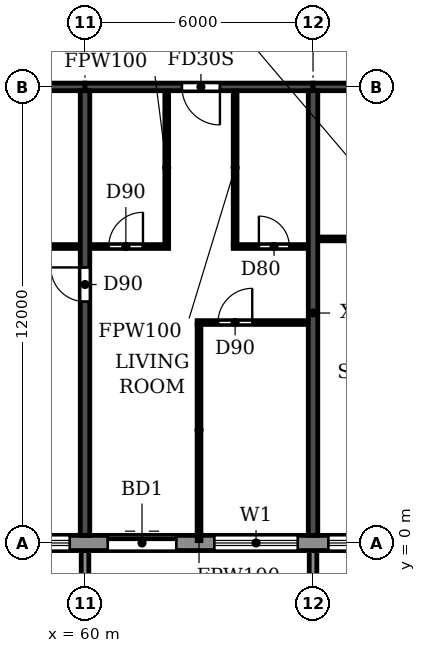
"""IFC4 building model, lengths in metres.
Left out: names, types, materials, properties, quantities, classifications, styles, units other than length and angle.
Written with IfcOpenShell. Run it as: python <this file> out.ifc"""

import sys

from ifc_helpers import new_model, si_unit, direction, frame, frame_2d, origin, place, context, subcontext, project, spatial, polyline, rectangle, outline, extrude, source, transform, mapped, element, fill, save


model = new_model("IFC4")
c1 = context("Model", 3, precision=1e-05, world=origin(), true_north=direction((0.0, 1.0)))
c2 = subcontext(c1, "Body", "Model", "MODEL_VIEW")
j1 = project(units=[si_unit("LENGTHUNIT", "METRE"), si_unit("PLANEANGLEUNIT", "RADIAN")], contexts=[c1])
p1 = place(None, origin())
s1 = spatial("IfcSite", under=j1, at=p1, CompositionType="ELEMENT")
p2 = place(p1, origin())
s2 = spatial("IfcBuilding", under=s1, at=p2, CompositionType="ELEMENT")
p3 = place(p2, frame((0.0, 0.0, 221.4)))
s3 = spatial("IfcBuildingStorey", under=s2, at=p3, CompositionType="ELEMENT", Elevation=221.4)
p4 = place(p3, frame((60.0, 0.2, 0.0), z_axis=(0.0, 0.0, 1.0), x_axis=(0.0, 1.0, 0.0)))
e1 = element("IfcWall", 1, at=p4, inside=s3, PredefinedType="SHEAR", context=c2, shape_type="SweptSolid", body=[
    extrude(rectangle(XDim=11.7, YDim=0.25, at=frame_2d((5.85, 0.0))), origin(), (0.0, 0.0, 1.0), 3.08),
])
p5 = place(p4, frame((6.15, 0.0, 0.0)))
e2 = element("IfcOpeningElement", 2, at=p5, cuts=e1, PredefinedType="OPENING", context=c2, shape_type="SweptSolid", body=[
    extrude(rectangle(XDim=0.9, YDim=2.1, at=frame_2d((0.45, 1.05))), frame((0.0, 0.135, 0.0), z_axis=(0.0, -1.0, 0.0), x_axis=(1.0, 0.0, 0.0)), (0.0, 0.0, 1.0), 0.27),
])
p6 = place(p3, frame((66.0, 0.2, 0.0), z_axis=(0.0, 0.0, 1.0), x_axis=(0.0, 1.0, 0.0)))
e3 = element("IfcWall", 3, at=p6, inside=s3, PredefinedType="SHEAR", context=c2, shape_type="SweptSolid", body=[
    extrude(rectangle(XDim=11.7, YDim=0.25, at=frame_2d((5.85, 0.0))), origin(), (0.0, 0.0, 1.0), 3.08),
])
p7 = place(p3, frame((54.0, 12.0, 0.0), z_axis=(0.0, 0.0, 1.0), x_axis=(1.0, 0.0, 0.0)))
e4 = element("IfcWall", 4, at=p7, inside=s3, PredefinedType="SHEAR", context=c2, shape_type="SweptSolid", body=[
    extrude(rectangle(XDim=6.0, YDim=0.2, at=frame_2d((3.0, 0.0))), origin(), (0.0, 0.0, 1.0), 2.48),
])
p8 = place(p3, frame((60.0, 12.0, 0.0), z_axis=(0.0, 0.0, 1.0), x_axis=(1.0, 0.0, 0.0)))
e5 = element("IfcWall", 5, at=p8, inside=s3, PredefinedType="SHEAR", context=c2, shape_type="SweptSolid", body=[
    extrude(rectangle(XDim=6.0, YDim=0.2, at=frame_2d((3.0, 0.0))), origin(), (0.0, 0.0, 1.0), 2.48),
])
p9 = place(p8, frame((2.55, 0.0, 0.0)))
e6 = element("IfcOpeningElement", 6, at=p9, cuts=e5, PredefinedType="OPENING", context=c2, shape_type="SweptSolid", body=[
    extrude(rectangle(XDim=1.0, YDim=2.1, at=frame_2d((0.5, 1.05))), frame((0.0, 0.11, 0.0), z_axis=(0.0, -1.0, 0.0), x_axis=(1.0, 0.0, 0.0)), (0.0, 0.0, 1.0), 0.22),
])
p10 = place(p3, frame((66.0, 12.0, 0.0), z_axis=(0.0, 0.0, 1.0), x_axis=(1.0, 0.0, 0.0)))
e7 = element("IfcWall", 7, at=p10, inside=s3, PredefinedType="SHEAR", context=c2, shape_type="SweptSolid", body=[
    extrude(rectangle(XDim=6.0, YDim=0.2, at=frame_2d((3.0, 0.0))), origin(), (0.0, 0.0, 1.0), 2.48),
])
p11 = place(p10, frame((2.45, 0.0, 0.0)))
e8 = element("IfcOpeningElement", 8, at=p11, cuts=e7, PredefinedType="OPENING", context=c2, shape_type="SweptSolid", body=[
    extrude(rectangle(XDim=1.0, YDim=2.1, at=frame_2d((0.5, 1.05))), frame((0.0, 0.11, 0.0), z_axis=(0.0, -1.0, 0.0), x_axis=(1.0, 0.0, 0.0)), (0.0, 0.0, 1.0), 0.22),
])
p12 = place(p3, frame((22.683, 0.0, 0.0), z_axis=(0.0, 0.0, 1.0), x_axis=(1.0, 0.0, 0.0)))
e9 = element("IfcWall", 9, at=p12, inside=s3, PredefinedType="STANDARD", context=c2, shape_type="SweptSolid", body=[
    extrude(rectangle(XDim=56.634, YDim=0.4, at=frame_2d((28.317, 0.0))), origin(), (0.0, 0.0, 1.0), 3.08),
])
p13 = place(p12, frame((1.717, 0.0, 0.9)))
e10 = element("IfcOpeningElement", 10, at=p13, cuts=e9, PredefinedType="OPENING", context=c2, shape_type="SweptSolid", body=[
    extrude(rectangle(XDim=2.2, YDim=1.5, at=frame_2d((1.1, 0.75))), frame((0.0, 0.21, 0.0), z_axis=(0.0, -1.0, 0.0), x_axis=(1.0, 0.0, 0.0)), (0.0, 0.0, 1.0), 0.42),
])
p14 = place(p12, frame((4.917, 0.0, 0.0)))
e11 = element("IfcOpeningElement", 11, at=p14, cuts=e9, PredefinedType="OPENING", context=c2, shape_type="SweptSolid", body=[
    extrude(rectangle(XDim=1.8, YDim=2.4, at=frame_2d((0.9, 1.2))), frame((0.0, 0.21, 0.0), z_axis=(0.0, -1.0, 0.0), x_axis=(1.0, 0.0, 0.0)), (0.0, 0.0, 1.0), 0.42),
])
p15 = place(p12, frame((7.717, 0.0, 0.9)))
e12 = element("IfcOpeningElement", 12, at=p15, cuts=e9, PredefinedType="OPENING", context=c2, shape_type="SweptSolid", body=[
    extrude(rectangle(XDim=2.2, YDim=1.5, at=frame_2d((1.1, 0.75))), frame((0.0, 0.21, 0.0), z_axis=(0.0, -1.0, 0.0), x_axis=(1.0, 0.0, 0.0)), (0.0, 0.0, 1.0), 0.42),
])
p16 = place(p12, frame((10.717, 0.0, 0.9)))
e13 = element("IfcOpeningElement", 13, at=p16, cuts=e9, PredefinedType="OPENING", context=c2, shape_type="SweptSolid", body=[
    extrude(rectangle(XDim=2.2, YDim=1.5, at=frame_2d((1.1, 0.75))), frame((0.0, 0.21, 0.0), z_axis=(0.0, -1.0, 0.0), x_axis=(1.0, 0.0, 0.0)), (0.0, 0.0, 1.0), 0.42),
])
p17 = place(p12, frame((13.717, 0.0, 0.9)))
e14 = element("IfcOpeningElement", 14, at=p17, cuts=e9, PredefinedType="OPENING", context=c2, shape_type="SweptSolid", body=[
    extrude(rectangle(XDim=2.2, YDim=1.5, at=frame_2d((1.1, 0.75))), frame((0.0, 0.21, 0.0), z_axis=(0.0, -1.0, 0.0), x_axis=(1.0, 0.0, 0.0)), (0.0, 0.0, 1.0), 0.42),
])
p18 = place(p12, frame((16.917, 0.0, 0.0)))
e15 = element("IfcOpeningElement", 15, at=p18, cuts=e9, PredefinedType="OPENING", context=c2, shape_type="SweptSolid", body=[
    extrude(rectangle(XDim=1.8, YDim=2.4, at=frame_2d((0.9, 1.2))), frame((0.0, 0.21, 0.0), z_axis=(0.0, -1.0, 0.0), x_axis=(1.0, 0.0, 0.0)), (0.0, 0.0, 1.0), 0.42),
])
p19 = place(p12, frame((19.717, 0.0, 0.9)))
e16 = element("IfcOpeningElement", 16, at=p19, cuts=e9, PredefinedType="OPENING", context=c2, shape_type="SweptSolid", body=[
    extrude(rectangle(XDim=2.2, YDim=1.5, at=frame_2d((1.1, 0.75))), frame((0.0, 0.21, 0.0), z_axis=(0.0, -1.0, 0.0), x_axis=(1.0, 0.0, 0.0)), (0.0, 0.0, 1.0), 0.42),
])
p20 = place(p12, frame((22.717, 0.0, 0.9)))
e17 = element("IfcOpeningElement", 17, at=p20, cuts=e9, PredefinedType="OPENING", context=c2, shape_type="SweptSolid", body=[
    extrude(rectangle(XDim=2.2, YDim=1.5, at=frame_2d((1.1, 0.75))), frame((0.0, 0.21, 0.0), z_axis=(0.0, -1.0, 0.0), x_axis=(1.0, 0.0, 0.0)), (0.0, 0.0, 1.0), 0.42),
])
p21 = place(p12, frame((25.917, 0.0, 0.0)))
e18 = element("IfcOpeningElement", 18, at=p21, cuts=e9, PredefinedType="OPENING", context=c2, shape_type="SweptSolid", body=[
    extrude(rectangle(XDim=1.8, YDim=2.4, at=frame_2d((0.9, 1.2))), frame((0.0, 0.21, 0.0), z_axis=(0.0, -1.0, 0.0), x_axis=(1.0, 0.0, 0.0)), (0.0, 0.0, 1.0), 0.42),
])
p22 = place(p12, frame((28.717, 0.0, 0.9)))
e19 = element("IfcOpeningElement", 19, at=p22, cuts=e9, PredefinedType="OPENING", context=c2, shape_type="SweptSolid", body=[
    extrude(rectangle(XDim=2.2, YDim=1.5, at=frame_2d((1.1, 0.75))), frame((0.0, 0.21, 0.0), z_axis=(0.0, -1.0, 0.0), x_axis=(1.0, 0.0, 0.0)), (0.0, 0.0, 1.0), 0.42),
])
p23 = place(p12, frame((31.717, 0.0, 0.9)))
e20 = element("IfcOpeningElement", 20, at=p23, cuts=e9, PredefinedType="OPENING", context=c2, shape_type="SweptSolid", body=[
    extrude(rectangle(XDim=2.2, YDim=1.5, at=frame_2d((1.1, 0.75))), frame((0.0, 0.21, 0.0), z_axis=(0.0, -1.0, 0.0), x_axis=(1.0, 0.0, 0.0)), (0.0, 0.0, 1.0), 0.42),
])
p24 = place(p12, frame((34.717, 0.0, 0.9)))
e21 = element("IfcOpeningElement", 21, at=p24, cuts=e9, PredefinedType="OPENING", context=c2, shape_type="SweptSolid", body=[
    extrude(rectangle(XDim=2.2, YDim=1.5, at=frame_2d((1.1, 0.75))), frame((0.0, 0.21, 0.0), z_axis=(0.0, -1.0, 0.0), x_axis=(1.0, 0.0, 0.0)), (0.0, 0.0, 1.0), 0.42),
])
p25 = place(p12, frame((37.917, 0.0, 0.0)))
e22 = element("IfcOpeningElement", 22, at=p25, cuts=e9, PredefinedType="OPENING", context=c2, shape_type="SweptSolid", body=[
    extrude(rectangle(XDim=1.8, YDim=2.4, at=frame_2d((0.9, 1.2))), frame((0.0, 0.21, 0.0), z_axis=(0.0, -1.0, 0.0), x_axis=(1.0, 0.0, 0.0)), (0.0, 0.0, 1.0), 0.42),
])
p26 = place(p12, frame((40.717, 0.0, 0.9)))
e23 = element("IfcOpeningElement", 23, at=p26, cuts=e9, PredefinedType="OPENING", context=c2, shape_type="SweptSolid", body=[
    extrude(rectangle(XDim=2.2, YDim=1.5, at=frame_2d((1.1, 0.75))), frame((0.0, 0.21, 0.0), z_axis=(0.0, -1.0, 0.0), x_axis=(1.0, 0.0, 0.0)), (0.0, 0.0, 1.0), 0.42),
])
p27 = place(p12, frame((43.717, 0.0, 0.9)))
e24 = element("IfcOpeningElement", 24, at=p27, cuts=e9, PredefinedType="OPENING", context=c2, shape_type="SweptSolid", body=[
    extrude(rectangle(XDim=2.2, YDim=1.5, at=frame_2d((1.1, 0.75))), frame((0.0, 0.21, 0.0), z_axis=(0.0, -1.0, 0.0), x_axis=(1.0, 0.0, 0.0)), (0.0, 0.0, 1.0), 0.42),
])
p28 = place(p12, frame((46.717, 0.0, 0.9)))
e25 = element("IfcOpeningElement", 25, at=p28, cuts=e9, PredefinedType="OPENING", context=c2, shape_type="SweptSolid", body=[
    extrude(rectangle(XDim=2.2, YDim=1.5, at=frame_2d((1.1, 0.75))), frame((0.0, 0.21, 0.0), z_axis=(0.0, -1.0, 0.0), x_axis=(1.0, 0.0, 0.0)), (0.0, 0.0, 1.0), 0.42),
])
p29 = place(p12, frame((49.917, 0.0, 0.0)))
e26 = element("IfcOpeningElement", 26, at=p29, cuts=e9, PredefinedType="OPENING", context=c2, shape_type="SweptSolid", body=[
    extrude(rectangle(XDim=1.8, YDim=2.4, at=frame_2d((0.9, 1.2))), frame((0.0, 0.21, 0.0), z_axis=(0.0, -1.0, 0.0), x_axis=(1.0, 0.0, 0.0)), (0.0, 0.0, 1.0), 0.42),
])
p30 = place(p12, frame((52.717, 0.0, 0.9)))
e27 = element("IfcOpeningElement", 27, at=p30, cuts=e9, PredefinedType="OPENING", context=c2, shape_type="SweptSolid", body=[
    extrude(rectangle(XDim=2.2, YDim=1.5, at=frame_2d((1.1, 0.75))), frame((0.0, 0.21, 0.0), z_axis=(0.0, -1.0, 0.0), x_axis=(1.0, 0.0, 0.0)), (0.0, 0.0, 1.0), 0.42),
])
m1 = source(origin(), c2, "Body", "SweptSolid", [
    extrude(outline(polyline([(0.0, 0.0), (0.2, 0.0), (0.2, 1.65), (0.0, 1.65), (0.0, 0.0)])), origin(), (0.0, 0.0, 1.0), 3.1),
])
for number, where in (
    (28, (59.9, -1.85, 0.0)),
    (29, (65.9, -1.85, 0.0)),
):
    element("IfcWall", number, at=place(p3, frame(where)), inside=s3, PredefinedType="STANDARD", context=c2, shape_type="MappedRepresentation", body=[
        mapped(m1, transform((0.0, 0.0, 0.0))),
    ])
p31 = place(p3, frame((62.95, 5.8, 0.0), z_axis=(0.0, 0.0, 1.0), x_axis=(1.0, 0.0, 0.0)))
e30 = element("IfcWall", 30, at=p31, inside=s3, PredefinedType="PARTITIONING", context=c2, shape_type="SweptSolid", body=[
    extrude(rectangle(XDim=2.915, YDim=0.1, at=frame_2d((1.458, 0.0))), origin(), (0.0, 0.0, 1.0), 3.08),
])
p32 = place(p31, frame((0.55, 0.0, 0.0)))
e31 = element("IfcOpeningElement", 31, at=p32, cuts=e30, PredefinedType="OPENING", context=c2, shape_type="SweptSolid", body=[
    extrude(rectangle(XDim=0.9, YDim=2.1, at=frame_2d((0.45, 1.05))), frame((0.0, 0.06, 0.0), z_axis=(0.0, -1.0, 0.0), x_axis=(1.0, 0.0, 0.0)), (0.0, 0.0, 1.0), 0.12),
])
p33 = place(p3, frame((57.1, 7.8, 0.0), z_axis=(0.0, 0.0, 1.0), x_axis=(1.0, 0.0, 0.0)))
e32 = element("IfcWall", 32, at=p33, inside=s3, PredefinedType="PARTITIONING", context=c2, shape_type="SweptSolid", body=[
    extrude(rectangle(XDim=2.765, YDim=0.1, at=frame_2d((1.382, 0.0))), origin(), (0.0, 0.0, 1.0), 3.08),
])
p34 = place(p33, frame((1.0, 0.0, 0.0)))
e33 = element("IfcOpeningElement", 33, at=p34, cuts=e32, PredefinedType="OPENING", context=c2, shape_type="SweptSolid", body=[
    extrude(rectangle(XDim=0.8, YDim=2.1, at=frame_2d((0.4, 1.05))), frame((0.0, 0.06, 0.0), z_axis=(0.0, -1.0, 0.0), x_axis=(1.0, 0.0, 0.0)), (0.0, 0.0, 1.0), 0.12),
])
p35 = place(p3, frame((60.135, 7.8, 0.0), z_axis=(0.0, 0.0, 1.0), x_axis=(1.0, 0.0, 0.0)))
e34 = element("IfcWall", 34, at=p35, inside=s3, PredefinedType="PARTITIONING", context=c2, shape_type="SweptSolid", body=[
    extrude(rectangle(XDim=2.065, YDim=0.1, at=frame_2d((1.032, 0.0))), origin(), (0.0, 0.0, 1.0), 3.08),
])
p36 = place(p35, frame((0.49, 0.0, 0.0)))
e35 = element("IfcOpeningElement", 35, at=p36, cuts=e34, PredefinedType="OPENING", context=c2, shape_type="SweptSolid", body=[
    extrude(rectangle(XDim=0.9, YDim=2.1, at=frame_2d((0.45, 1.05))), frame((0.0, 0.06, 0.0), z_axis=(0.0, -1.0, 0.0), x_axis=(1.0, 0.0, 0.0)), (0.0, 0.0, 1.0), 0.12),
])
p37 = place(p3, frame((63.9, 7.8, 0.0), z_axis=(0.0, 0.0, 1.0), x_axis=(1.0, 0.0, 0.0)))
e36 = element("IfcWall", 36, at=p37, inside=s3, PredefinedType="PARTITIONING", context=c2, shape_type="SweptSolid", body=[
    extrude(rectangle(XDim=1.965, YDim=0.1, at=frame_2d((0.982, 0.0))), origin(), (0.0, 0.0, 1.0), 3.08),
])
p38 = place(p37, frame((0.675, 0.0, 0.0)))
e37 = element("IfcOpeningElement", 37, at=p38, cuts=e36, PredefinedType="OPENING", context=c2, shape_type="SweptSolid", body=[
    extrude(rectangle(XDim=0.8, YDim=2.1, at=frame_2d((0.4, 1.05))), frame((0.0, 0.06, 0.0), z_axis=(0.0, -1.0, 0.0), x_axis=(1.0, 0.0, 0.0)), (0.0, 0.0, 1.0), 0.12),
])
p39 = place(p3, frame((66.135, 8.0, 0.0), z_axis=(0.0, 0.0, 1.0), x_axis=(1.0, 0.0, 0.0)))
e38 = element("IfcWall", 38, at=p39, inside=s3, PredefinedType="PARTITIONING", context=c2, shape_type="SweptSolid", body=[
    extrude(rectangle(XDim=1.965, YDim=0.1, at=frame_2d((0.982, 0.0))), origin(), (0.0, 0.0, 1.0), 3.08),
])
p40 = place(p3, frame((62.15, 7.85, 0.0), z_axis=(0.0, 0.0, 1.0), x_axis=(0.0, 1.0, 0.0)))
e39 = element("IfcWall", 39, at=p40, inside=s3, PredefinedType="PARTITIONING", context=c2, shape_type="SweptSolid", body=[
    extrude(rectangle(XDim=4.04, YDim=0.1, at=frame_2d((2.02, 0.0))), origin(), (0.0, 0.0, 1.0), 3.08),
])
p41 = place(p3, frame((63.0, 0.06, 0.0), z_axis=(0.0, 0.0, 1.0), x_axis=(0.0, 1.0, 0.0)))
e40 = element("IfcWall", 40, at=p41, inside=s3, PredefinedType="PARTITIONING", context=c2, shape_type="SweptSolid", body=[
    extrude(rectangle(XDim=5.69, YDim=0.1, at=frame_2d((2.845, 0.0))), origin(), (0.0, 0.0, 1.0), 3.08),
])
p42 = place(p3, frame((63.95, 7.85, 0.0), z_axis=(0.0, 0.0, 1.0), x_axis=(0.0, 1.0, 0.0)))
e41 = element("IfcWall", 41, at=p42, inside=s3, PredefinedType="PARTITIONING", context=c2, shape_type="SweptSolid", body=[
    extrude(rectangle(XDim=4.04, YDim=0.1, at=frame_2d((2.02, 0.0))), origin(), (0.0, 0.0, 1.0), 3.08),
])
p43 = place(p24, origin())
e42 = element("IfcWindow", 42, at=p43, inside=s3, PartitioningType="DOUBLE_PANEL_HORIZONTAL", PredefinedType="WINDOW", context=c2, shape_type="SweptSolid", body=[
    extrude(rectangle(XDim=2.2, YDim=1.5, at=frame_2d((1.1, 0.75))), frame((0.0, 0.03, 0.0), z_axis=(0.0, -1.0, 0.0), x_axis=(1.0, 0.0, 0.0)), (0.0, 0.0, 1.0), 0.06),
])
fill(e21, e42)
p44 = place(p25, origin())
e43 = element("IfcDoor", 43, at=p44, inside=s3, OperationType="DOUBLE_DOOR_SLIDING", PredefinedType="DOOR", context=c2, shape_type="SweptSolid", body=[
    extrude(rectangle(XDim=1.8, YDim=2.4, at=frame_2d((0.9, 1.2))), frame((0.0, 0.025, 0.0), z_axis=(0.0, -1.0, 0.0), x_axis=(1.0, 0.0, 0.0)), (0.0, 0.0, 1.0), 0.05),
])
fill(e22, e43)
p45 = place(p26, origin())
e44 = element("IfcWindow", 44, at=p45, inside=s3, PartitioningType="DOUBLE_PANEL_HORIZONTAL", PredefinedType="WINDOW", context=c2, shape_type="SweptSolid", body=[
    extrude(rectangle(XDim=2.2, YDim=1.5, at=frame_2d((1.1, 0.75))), frame((0.0, 0.03, 0.0), z_axis=(0.0, -1.0, 0.0), x_axis=(1.0, 0.0, 0.0)), (0.0, 0.0, 1.0), 0.06),
])
fill(e23, e44)
p46 = place(p27, origin())
e45 = element("IfcWindow", 45, at=p46, inside=s3, PartitioningType="DOUBLE_PANEL_HORIZONTAL", PredefinedType="WINDOW", context=c2, shape_type="SweptSolid", body=[
    extrude(rectangle(XDim=2.2, YDim=1.5, at=frame_2d((1.1, 0.75))), frame((0.0, 0.03, 0.0), z_axis=(0.0, -1.0, 0.0), x_axis=(1.0, 0.0, 0.0)), (0.0, 0.0, 1.0), 0.06),
])
fill(e24, e45)
p47 = place(p5, origin())
e46 = element("IfcDoor", 46, at=p47, inside=s3, OperationType="SINGLE_SWING_RIGHT", PredefinedType="DOOR", context=c2, shape_type="SweptSolid", body=[
    extrude(rectangle(XDim=0.9, YDim=2.1, at=frame_2d((0.45, 1.05))), frame((0.0, 0.025, 0.0), z_axis=(0.0, -1.0, 0.0), x_axis=(1.0, 0.0, 0.0)), (0.0, 0.0, 1.0), 0.05),
])
fill(e2, e46)
p48 = place(p36, origin())
e47 = element("IfcDoor", 47, at=p48, inside=s3, OperationType="SINGLE_SWING_RIGHT", PredefinedType="DOOR", context=c2, shape_type="SweptSolid", body=[
    extrude(rectangle(XDim=0.9, YDim=2.1, at=frame_2d((0.45, 1.05))), frame((0.0, 0.025, 0.0), z_axis=(0.0, -1.0, 0.0), x_axis=(1.0, 0.0, 0.0)), (0.0, 0.0, 1.0), 0.05),
])
fill(e35, e47)
p49 = place(p9, frame((1.0, 0.0, 0.0), z_axis=(0.0, 0.0, 1.0), x_axis=(-1.0, 0.0, 0.0)))
e48 = element("IfcDoor", 48, at=p49, inside=s3, OperationType="SINGLE_SWING_LEFT", PredefinedType="DOOR", context=c2, shape_type="SweptSolid", body=[
    extrude(rectangle(XDim=1.0, YDim=2.1, at=frame_2d((0.5, 1.05))), frame((0.0, 0.025, 0.0), z_axis=(0.0, -1.0, 0.0), x_axis=(1.0, 0.0, 0.0)), (0.0, 0.0, 1.0), 0.05),
])
fill(e6, e48)
p50 = place(p32, origin())
e49 = element("IfcDoor", 49, at=p50, inside=s3, OperationType="SINGLE_SWING_RIGHT", PredefinedType="DOOR", context=c2, shape_type="SweptSolid", body=[
    extrude(rectangle(XDim=0.9, YDim=2.1, at=frame_2d((0.45, 1.05))), frame((0.0, 0.025, 0.0), z_axis=(0.0, -1.0, 0.0), x_axis=(1.0, 0.0, 0.0)), (0.0, 0.0, 1.0), 0.05),
])
fill(e31, e49)
p51 = place(p38, origin())
e50 = element("IfcDoor", 50, at=p51, inside=s3, OperationType="SINGLE_SWING_LEFT", PredefinedType="DOOR", context=c2, shape_type="SweptSolid", body=[
    extrude(rectangle(XDim=0.8, YDim=2.1, at=frame_2d((0.4, 1.05))), frame((0.0, 0.025, 0.0), z_axis=(0.0, -1.0, 0.0), x_axis=(1.0, 0.0, 0.0)), (0.0, 0.0, 1.0), 0.05),
])
fill(e37, e50)
save(model, sys.argv[1])
